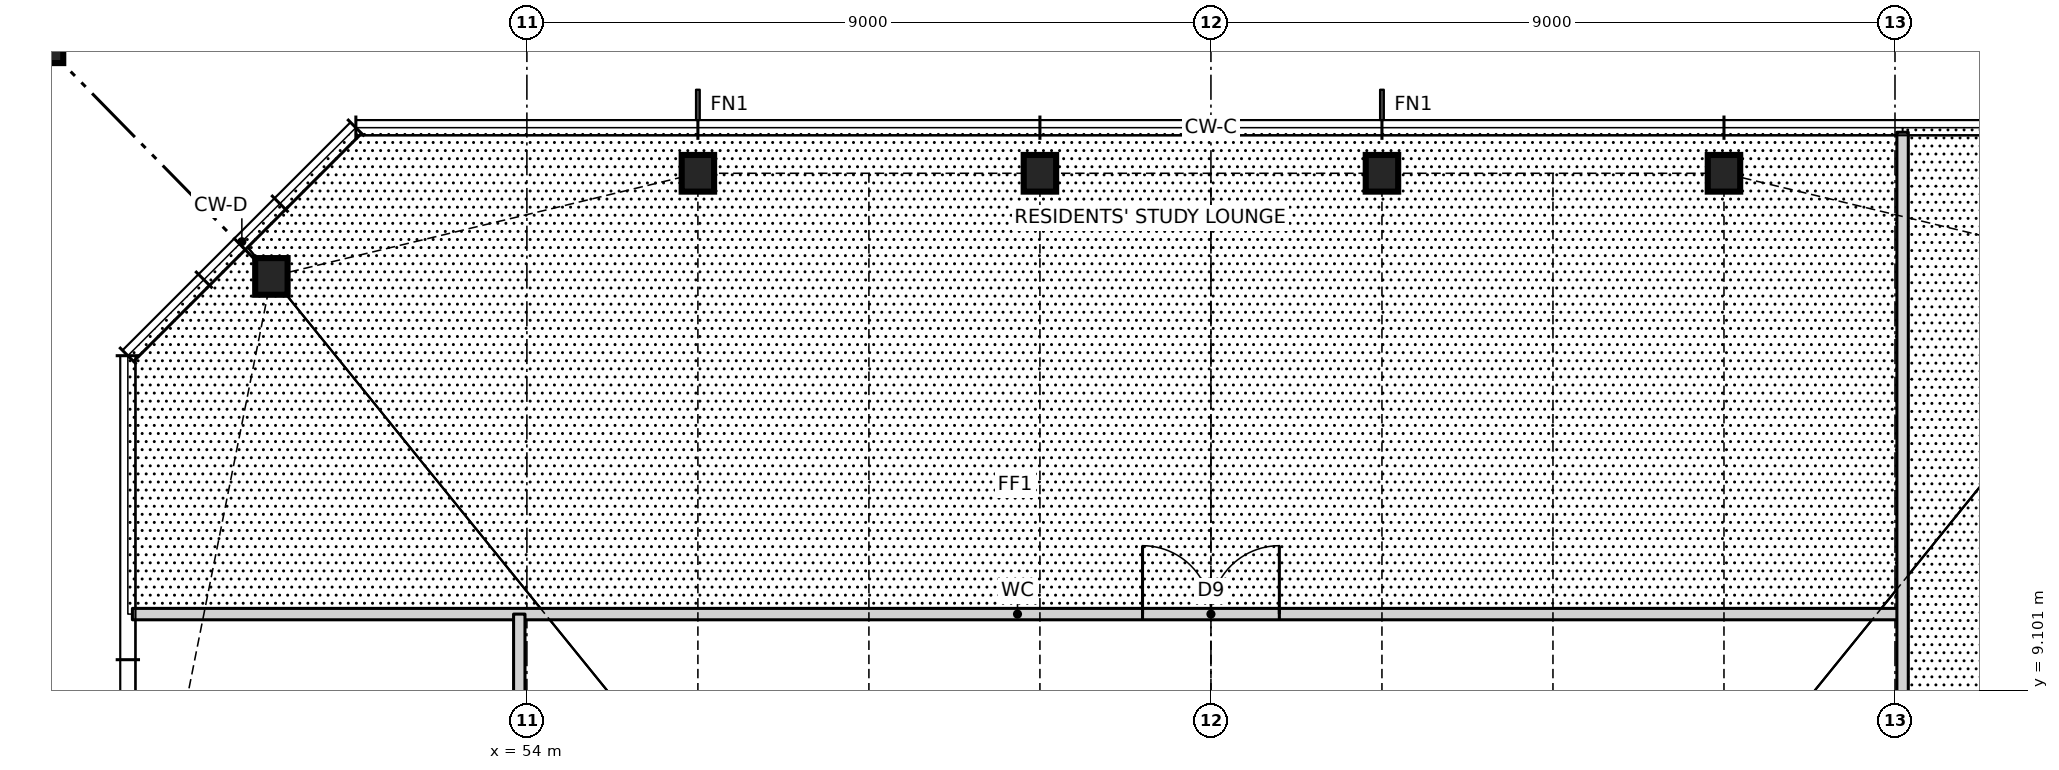
"""IFC4 building model, lengths in metres.
Left out: names, types, materials, properties, quantities, classifications, styles, units other than length and angle.
Written with IfcOpenShell. Run it as: python <this file> out.ifc"""

import sys

from ifc_helpers import new_model, si_unit, direction, frame, frame_2d, origin, origin_2d, place, context, subcontext, project, spatial, rectangle, hollow_rectangle, i_section, extrude, element, fill, save


model = new_model("IFC4")
c1 = context("Model", 3, precision=1e-05, world=origin(), true_north=direction((0.0, 1.0)))
c2 = subcontext(c1, "Body", "Model", "MODEL_VIEW")
j1 = project(units=[si_unit("LENGTHUNIT", "METRE"), si_unit("PLANEANGLEUNIT", "RADIAN")], contexts=[c1])
p1 = place(None, origin())
s1 = spatial("IfcSite", under=j1, at=p1, CompositionType="ELEMENT")
p2 = place(p1, origin())
s2 = spatial("IfcBuilding", under=s1, at=p2, CompositionType="ELEMENT")
p3 = place(p2, frame((0.0, 0.0, 98.0)))
s3 = spatial("IfcBuildingStorey", under=s2, at=p3, CompositionType="ELEMENT", Elevation=98.0)
for number, where, z_axis, x_axis in (
    (1, (69.75, 15.9, 0.0), (0.0, 0.0, 1.0), (1.0, 0.0, 0.0)),
    (2, (65.25, 15.9, 0.0), (0.0, 0.0, 1.0), (1.0, 0.0, 0.0)),
    (3, (60.75, 15.9, 0.0), (0.0, 0.0, 1.0), (1.0, 0.0, 0.0)),
    (4, (56.25, 15.9, 0.0), (0.0, 0.0, 1.0), (1.0, 0.0, 0.0)),
    (5, (50.639, 14.543, 0.0), (0.0, 0.0, 1.0), (1.0, 0.0, 0.0)),
):
    element("IfcColumn", number, at=place(p3, frame(where, z_axis=z_axis, x_axis=x_axis)), inside=s3, PredefinedType="COLUMN", context=c2, shape_type="SweptSolid", body=[
        extrude(i_section(OverallWidth=0.427, OverallDepth=0.483, WebThickness=0.051, FlangeThickness=0.082, at=origin_2d()), origin(), (0.0, 0.0, 1.0), 3.5),
    ])
p4 = place(p3, frame((47.35, 17.9, 0.0), z_axis=(0.0, 0.0, 1.0), x_axis=(1.0, 0.0, 0.0)))
e6 = element("IfcColumn", 6, at=p4, inside=s3, PredefinedType="COLUMN", context=c2, shape_type="SweptSolid", body=[
    extrude(hollow_rectangle(XDim=1.1, YDim=1.1, WallThickness=0.06, at=origin_2d()), origin(), (0.0, 0.0, 1.0), 3.5),
])
p5 = place(p3, frame((48.81, 10.1, 0.0), z_axis=(0.0, 0.0, 1.0), x_axis=(1.0, 0.0, 0.0)))
e7 = element("IfcWall", 7, at=p5, inside=s3, PredefinedType="PARTITIONING", context=c2, shape_type="SweptSolid", body=[
    extrude(rectangle(XDim=23.29, YDim=0.15, at=frame_2d((11.645, 0.0))), origin(), (0.0, 0.0, 1.0), 3.27),
])
p6 = place(p5, frame((13.29, 0.0, 0.0)))
e8 = element("IfcOpeningElement", 8, at=p6, cuts=e7, PredefinedType="OPENING", context=c2, shape_type="SweptSolid", body=[
    extrude(rectangle(XDim=1.8, YDim=2.1, at=frame_2d((0.9, 1.05))), frame((0.0, 0.085, 0.0), z_axis=(0.0, -1.0, 0.0), x_axis=(1.0, 0.0, 0.0)), (0.0, 0.0, 1.0), 0.17),
])
p7 = place(p3, frame((72.1, -10.1, 0.0), z_axis=(0.0, 0.0, 1.0), x_axis=(0.0, 1.0, 0.0)))
e9 = element("IfcWall", 9, at=p7, inside=s3, PredefinedType="PARTITIONING", context=c2, shape_type="SweptSolid", body=[
    extrude(rectangle(XDim=26.54, YDim=0.15, at=frame_2d((13.27, 0.0))), origin(), (0.0, 0.0, 1.0), 3.27),
])
p8 = place(p7, frame((1.15, 0.0, 0.0)))
e10 = element("IfcOpeningElement", 10, at=p8, cuts=e9, PredefinedType="OPENING", context=c2, shape_type="SweptSolid", body=[
    extrude(rectangle(XDim=0.9, YDim=2.1, at=frame_2d((0.45, 1.05))), frame((0.0, 0.085, 0.0), z_axis=(0.0, -1.0, 0.0), x_axis=(1.0, 0.0, 0.0)), (0.0, 0.0, 1.0), 0.17),
])
p9 = place(p7, frame((4.25, 0.0, 0.0)))
e11 = element("IfcOpeningElement", 11, at=p9, cuts=e9, PredefinedType="OPENING", context=c2, shape_type="SweptSolid", body=[
    extrude(rectangle(XDim=0.9, YDim=2.1, at=frame_2d((0.45, 1.05))), frame((0.0, 0.085, 0.0), z_axis=(0.0, -1.0, 0.0), x_axis=(1.0, 0.0, 0.0)), (0.0, 0.0, 1.0), 0.17),
])
p10 = place(p7, frame((6.95, 0.0, 0.0)))
e12 = element("IfcOpeningElement", 12, at=p10, cuts=e9, PredefinedType="OPENING", context=c2, shape_type="SweptSolid", body=[
    extrude(rectangle(XDim=0.9, YDim=2.1, at=frame_2d((0.45, 1.05))), frame((0.0, 0.085, 0.0), z_axis=(0.0, -1.0, 0.0), x_axis=(1.0, 0.0, 0.0)), (0.0, 0.0, 1.0), 0.17),
])
p11 = place(p7, frame((13.5, 0.0, 0.0)))
e13 = element("IfcOpeningElement", 13, at=p11, cuts=e9, PredefinedType="OPENING", context=c2, shape_type="SweptSolid", body=[
    extrude(rectangle(XDim=1.8, YDim=2.1, at=frame_2d((0.9, 1.05))), frame((0.0, 0.085, 0.0), z_axis=(0.0, -1.0, 0.0), x_axis=(1.0, 0.0, 0.0)), (0.0, 0.0, 1.0), 0.17),
])
p12 = place(p3, frame((53.9, -16.44, 0.0), z_axis=(0.0, 0.0, 1.0), x_axis=(0.0, 1.0, 0.0)))
e14 = element("IfcWall", 14, at=p12, inside=s3, PredefinedType="PARTITIONING", context=c2, shape_type="SweptSolid", body=[
    extrude(rectangle(XDim=26.54, YDim=0.15, at=frame_2d((13.27, 0.0))), origin(), (0.0, 0.0, 1.0), 3.27),
])
p13 = place(p12, frame((15.54, 0.0, 0.0)))
e15 = element("IfcOpeningElement", 15, at=p13, cuts=e14, PredefinedType="OPENING", context=c2, shape_type="SweptSolid", body=[
    extrude(rectangle(XDim=1.8, YDim=2.1, at=frame_2d((0.9, 1.05))), frame((0.0, 0.085, 0.0), z_axis=(0.0, -1.0, 0.0), x_axis=(1.0, 0.0, 0.0)), (0.0, 0.0, 1.0), 0.17),
])
p14 = place(p6, origin())
e16 = element("IfcDoor", 16, at=p14, inside=s3, OperationType="DOUBLE_DOOR_SINGLE_SWING", PredefinedType="DOOR", context=c2, shape_type="SweptSolid", body=[
    extrude(rectangle(XDim=1.8, YDim=2.1, at=frame_2d((0.9, 1.05))), frame((0.0, 0.025, 0.0), z_axis=(0.0, -1.0, 0.0), x_axis=(1.0, 0.0, 0.0)), (0.0, 0.0, 1.0), 0.05),
])
fill(e8, e16)
save(model, sys.argv[1])
